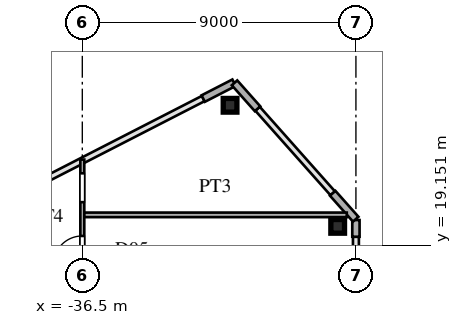
"""IFC4 building model, lengths in metres.
Left out: names, types, materials, properties, quantities, classifications, styles, units other than length and angle.
Written with IfcOpenShell. Run it as: python <this file> out.ifc"""

import sys

from ifc_helpers import new_model, si_unit, direction, frame, frame_2d, origin, origin_2d, place, context, subcontext, project, spatial, rectangle, hollow_rectangle, extrude, source, transform, mapped, element, fill, save


model = new_model("IFC4")
c1 = context("Model", 3, precision=1e-05, world=origin(), true_north=direction((0.0, 1.0)))
c2 = subcontext(c1, "Body", "Model", "MODEL_VIEW")
j1 = project(units=[si_unit("LENGTHUNIT", "METRE"), si_unit("PLANEANGLEUNIT", "RADIAN")], contexts=[c1])
p1 = place(None, origin())
s1 = spatial("IfcSite", under=j1, at=p1, CompositionType="ELEMENT")
p2 = place(p1, origin())
s2 = spatial("IfcBuilding", under=s1, at=p2, CompositionType="ELEMENT")
p3 = place(p2, frame((0.0, 0.0, 144.0)))
s3 = spatial("IfcBuildingStorey", under=s2, at=p3, CompositionType="ELEMENT", Elevation=144.0)
m1 = source(origin(), c2, "Body", "SweptSolid", [
    extrude(hollow_rectangle(XDim=0.45, YDim=0.45, WallThickness=0.018, at=origin_2d()), origin(), (0.0, 0.0, 1.0), 3.6),
])
for number, where, z_axis, x_axis in (
    (1, (-28.1, 19.772, 0.0), (0.0, 0.0, 1.0), (1.0, 0.0, 0.0)),
    (2, (-31.64, 23.754, 0.0), (0.0, 0.0, 1.0), (1.0, 0.0, 0.0)),
):
    element("IfcColumn", number, at=place(p3, frame(where, z_axis=z_axis, x_axis=x_axis)), inside=s3, PredefinedType="COLUMN", context=c2, shape_type="MappedRepresentation", body=[
        mapped(m1, transform((0.0, 0.0, 0.0), scale=1.0)),
    ])
p4 = place(p3, frame((-27.5, 19.43, 0.0), z_axis=(0.0, 0.0, 1.0), x_axis=(0.0, 1.0, 0.0)))
e3 = element("IfcWall", 3, at=p4, inside=s3, PredefinedType="SOLIDWALL", context=c2, shape_type="SweptSolid", body=[
    extrude(rectangle(XDim=0.55, YDim=0.24, at=frame_2d((0.275, 0.0))), origin(), (0.0, 0.0, 1.0), 3.38),
])
for number, where, z_axis, x_axis in (
    (4, (-27.507, 20.008, 0.0), (0.0, 0.0, 1.0), (-0.664, 0.747, 0.0)),
    (5, (-30.736, 23.64, 0.0), (0.0, 0.0, 1.0), (-0.664, 0.747, 0.0)),
):
    element("IfcWall", number, at=place(p3, frame(where, z_axis=z_axis, x_axis=x_axis)), inside=s3, PredefinedType="SOLIDWALL", context=c2, shape_type="SweptSolid", body=[
        extrude(rectangle(XDim=1.14, YDim=0.24, at=frame_2d((0.57, 0.0))), origin(), (0.0, 0.0, 1.0), 3.38),
    ])
p5 = place(p3, frame((-31.509, 24.495, 0.0), z_axis=(0.0, 0.0, 1.0), x_axis=(-0.889797395748, -0.456355776255, 0.0)))
e6 = element("IfcWall", 6, at=p5, inside=s3, PredefinedType="SOLIDWALL", context=c2, shape_type="SweptSolid", body=[
    extrude(rectangle(XDim=1.14, YDim=0.24, at=frame_2d((0.57, 0.0))), origin(), (0.0, 0.0, 1.0), 3.38),
])
p6 = place(p3, frame((-36.45, 20.15, 0.0), z_axis=(0.0, 0.0, 1.0), x_axis=(1.0, 0.0, 0.0)))
e7 = element("IfcWall", 7, at=p6, inside=s3, PredefinedType="PARTITIONING", context=c2, shape_type="SweptSolid", body=[
    extrude(rectangle(XDim=8.649, YDim=0.15, at=frame_2d((4.325, 0.0))), origin(), (0.0, 0.0, 1.0), 3.38),
])
p7 = place(p3, frame((-36.5, 15.85, 0.0), z_axis=(0.0, 0.0, 1.0), x_axis=(0.0, 1.0, 0.0)))
e8 = element("IfcWall", 8, at=p7, inside=s3, PredefinedType="PARTITIONING", context=c2, shape_type="SweptSolid", body=[
    extrude(rectangle(XDim=6.119, YDim=0.13, at=frame_2d((3.06, 0.0))), origin(), (0.0, 0.0, 1.0), 2.78),
])
p8 = place(p7, frame((2.656, 0.0, 0.0)))
e9 = element("IfcOpeningElement", 9, at=p8, cuts=e8, PredefinedType="OPENING", context=c2, shape_type="SweptSolid", body=[
    extrude(rectangle(XDim=0.95, YDim=2.15, at=frame_2d((0.475, 1.075))), frame((0.0, 0.075, 0.0), z_axis=(0.0, -1.0, 0.0), x_axis=(1.0, 0.0, 0.0)), (0.0, 0.0, 1.0), 0.15),
])
p9 = place(p7, frame((4.717, 0.0, 0.0)))
e10 = element("IfcOpeningElement", 10, at=p9, cuts=e8, PredefinedType="OPENING", context=c2, shape_type="SweptSolid", body=[
    extrude(rectangle(XDim=0.95, YDim=2.15, at=frame_2d((0.475, 1.075))), frame((0.0, 0.075, 0.0), z_axis=(0.0, -1.0, 0.0), x_axis=(1.0, 0.0, 0.0)), (0.0, 0.0, 1.0), 0.15),
])
m2 = source(origin(), c2, "Body", "SweptSolid", [
    extrude(rectangle(XDim=0.95, YDim=2.15, at=frame_2d((0.475, 1.075))), frame((0.0, 0.025, 0.0), z_axis=(0.0, -1.0, 0.0), x_axis=(1.0, 0.0, 0.0)), (0.0, 0.0, 1.0), 0.05),
])
p10 = place(p8, origin())
e11 = element("IfcDoor", 11, at=p10, inside=s3, OperationType="SINGLE_SWING_LEFT", PredefinedType="DOOR", context=c2, shape_type="MappedRepresentation", body=[
    mapped(m2, transform((0.0, 0.0, 0.0), scale=1.0)),
])
fill(e9, e11)
save(model, sys.argv[1])
